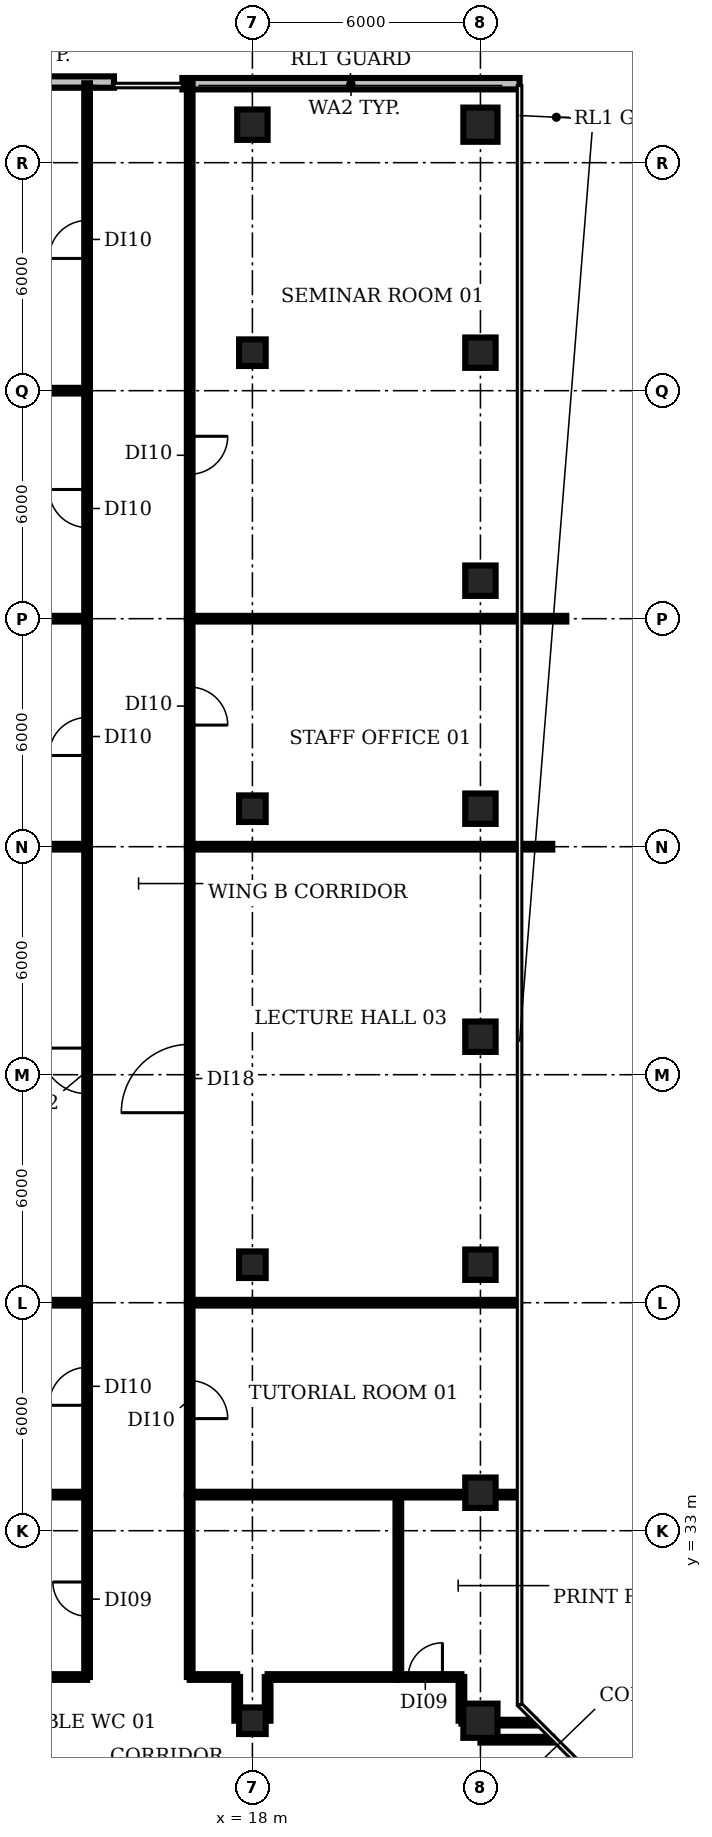
"""IFC4 building model, lengths in metres.
Left out: names, types, materials, properties, quantities, classifications, styles, units other than length and angle.
Written with IfcOpenShell. Run it as: python <this file> out.ifc"""

import sys

from ifc_helpers import new_model, si_unit, direction, frame, frame_2d, origin, origin_2d, place, context, subcontext, project, spatial, rectangle, circle, extrude, element, fill, save


model = new_model("IFC4")
c1 = context("Model", 3, precision=1e-05, world=origin(), true_north=direction((0.0, 1.0)))
c2 = subcontext(c1, "Body", "Model", "MODEL_VIEW")
j1 = project(units=[si_unit("LENGTHUNIT", "METRE"), si_unit("PLANEANGLEUNIT", "RADIAN")], contexts=[c1])
p1 = place(None, origin())
s1 = spatial("IfcSite", under=j1, at=p1, CompositionType="ELEMENT")
p2 = place(p1, origin())
s2 = spatial("IfcBuilding", under=s1, at=p2, CompositionType="ELEMENT")
p3 = place(p2, frame((0.0, 0.0, 243.2)))
s3 = spatial("IfcBuildingStorey", under=s2, at=p3, CompositionType="ELEMENT", Elevation=243.2)
for number, where, z_axis, x_axis in (
    (1, (18.0, 28.0, 0.0), (0.0, 0.0, 1.0), (1.0, 0.0, 0.0)),
    (2, (18.0, 40.0, 0.0), (0.0, 0.0, 1.0), (1.0, 0.0, 0.0)),
    (3, (18.0, 52.0, 0.0), (0.0, 0.0, 1.0), (1.0, 0.0, 0.0)),
    (4, (18.0, 64.0, 0.0), (0.0, 0.0, 1.0), (1.0, 0.0, 0.0)),
):
    element("IfcColumn", number, at=place(p3, frame(where, z_axis=z_axis, x_axis=x_axis)), inside=s3, PredefinedType="COLUMN", context=c2, shape_type="SweptSolid", body=[
        extrude(rectangle(XDim=0.7, YDim=0.7, at=origin_2d()), origin(), (0.0, 0.0, 1.0), 3.85),
    ])
p4 = place(p3, frame((18.0, 70.0, 0.0), z_axis=(0.0, 0.0, 1.0), x_axis=(1.0, 0.0, 0.0)))
e5 = element("IfcColumn", 5, at=p4, inside=s3, PredefinedType="COLUMN", context=c2, shape_type="SweptSolid", body=[
    extrude(rectangle(XDim=0.8, YDim=0.8, at=origin_2d()), origin(), (0.0, 0.0, 1.0), 3.85),
])
p5 = place(p3, frame((24.0, 28.0, 0.0), z_axis=(0.0, 0.0, 1.0), x_axis=(1.0, 0.0, 0.0)))
e6 = element("IfcColumn", 6, at=p5, inside=s3, PredefinedType="COLUMN", context=c2, shape_type="SweptSolid", body=[
    extrude(circle(Radius=0.45, at=origin_2d()), origin(), (0.0, 0.0, 1.0), 3.85),
])
for number, where, z_axis, x_axis in (
    (7, (24.0, 34.0, 0.0), (0.0, 0.0, 1.0), (1.0, 0.0, 0.0)),
    (8, (24.0, 40.0, 0.0), (0.0, 0.0, 1.0), (1.0, 0.0, 0.0)),
    (9, (24.0, 46.0, 0.0), (0.0, 0.0, 1.0), (1.0, 0.0, 0.0)),
    (10, (24.0, 52.0, 0.0), (0.0, 0.0, 1.0), (1.0, 0.0, 0.0)),
    (11, (24.0, 58.0, 0.0), (0.0, 0.0, 1.0), (1.0, 0.0, 0.0)),
    (12, (24.0, 64.0, 0.0), (0.0, 0.0, 1.0), (1.0, 0.0, 0.0)),
):
    element("IfcColumn", number, at=place(p3, frame(where, z_axis=z_axis, x_axis=x_axis)), inside=s3, PredefinedType="COLUMN", context=c2, shape_type="SweptSolid", body=[
        extrude(rectangle(XDim=0.8, YDim=0.8, at=origin_2d()), origin(), (0.0, 0.0, 1.0), 3.85),
    ])
p6 = place(p3, frame((24.0, 70.0, 0.0), z_axis=(0.0, 0.0, 1.0), x_axis=(1.0, 0.0, 0.0)))
e13 = element("IfcColumn", 13, at=p6, inside=s3, PredefinedType="COLUMN", context=c2, shape_type="SweptSolid", body=[
    extrude(circle(Radius=0.45, at=origin_2d()), origin(), (0.0, 0.0, 1.0), 3.85),
])
p7 = place(p3, frame((25.03, 71.078, 0.0), z_axis=(0.0, 0.0, 1.0), x_axis=(-1.0, 0.0, 0.0)))
e14 = element("IfcWall", 14, at=p7, inside=s3, PredefinedType="SOLIDWALL", context=c2, shape_type="SweptSolid", body=[
    extrude(rectangle(XDim=8.873, YDim=0.3, at=frame_2d((4.436, 0.0))), origin(), (0.0, 0.0, 1.0), 3.85),
])
p8 = place(p3, frame((14.357, 71.122, 0.0), z_axis=(0.0, 0.0, 1.0), x_axis=(-1.0, 0.0, 0.0)))
e15 = element("IfcWall", 15, at=p8, inside=s3, PredefinedType="SOLIDWALL", context=c2, shape_type="SweptSolid", body=[
    extrude(rectangle(XDim=4.715, YDim=0.3, at=frame_2d((2.357, 0.0))), origin(), (0.0, 0.0, 1.0), 3.85),
])
p9 = place(p3, frame((-1.16, 33.95, 0.0), z_axis=(0.0, 0.0, 1.0), x_axis=(1.0, 0.0, 0.0)))
e16 = element("IfcWall", 16, at=p9, inside=s3, PredefinedType="PARTITIONING", context=c2, shape_type="SweptSolid", body=[
    extrude(rectangle(XDim=14.81, YDim=0.15, at=frame_2d((7.405, 0.0))), origin(), (0.0, 0.0, 1.0), 2.88),
])
for number, where, z_axis, x_axis in (
    (17, (-0.98, 39.0, 0.0), (0.0, 0.0, 1.0), (1.0, 0.0, 0.0)),
    (18, (-0.98, 51.0, 0.0), (0.0, 0.0, 1.0), (1.0, 0.0, 0.0)),
    (19, (-0.98, 57.0, 0.0), (0.0, 0.0, 1.0), (1.0, 0.0, 0.0)),
    (20, (-0.98, 63.0, 0.0), (0.0, 0.0, 1.0), (1.0, 0.0, 0.0)),
):
    element("IfcWall", number, at=place(p3, frame(where, z_axis=z_axis, x_axis=x_axis)), inside=s3, PredefinedType="PARTITIONING", context=c2, shape_type="SweptSolid", body=[
        extrude(rectangle(XDim=14.63, YDim=0.15, at=frame_2d((7.315, 0.0))), origin(), (0.0, 0.0, 1.0), 2.88),
    ])
p10 = place(p3, frame((6.4, 29.15, 0.0), z_axis=(0.0, 0.0, 1.0), x_axis=(1.0, 0.0, 0.0)))
e21 = element("IfcWall", 21, at=p10, inside=s3, PredefinedType="PARTITIONING", context=c2, shape_type="SweptSolid", body=[
    extrude(rectangle(XDim=7.25, YDim=0.15, at=frame_2d((3.625, 0.0))), origin(), (0.0, 0.0, 1.0), 2.88),
])
p11 = place(p3, frame((13.65, 29.15, 0.0), z_axis=(0.0, 0.0, 1.0), x_axis=(0.0, 1.0, 0.0)))
e22 = element("IfcWall", 22, at=p11, inside=s3, PredefinedType="PARTITIONING", context=c2, shape_type="SweptSolid", body=[
    extrude(rectangle(XDim=4.8, YDim=0.15, at=frame_2d((2.4, 0.0))), origin(), (0.0, 0.0, 1.0), 2.88),
])
p12 = place(p11, frame((1.6, 0.0, 0.0)))
e23 = element("IfcOpeningElement", 23, at=p12, cuts=e22, PredefinedType="OPENING", context=c2, shape_type="SweptSolid", body=[
    extrude(rectangle(XDim=0.9, YDim=2.1, at=frame_2d((0.45, 1.05))), frame((0.0, 0.085, 0.0), z_axis=(0.0, -1.0, 0.0), x_axis=(1.0, 0.0, 0.0)), (0.0, 0.0, 1.0), 0.17),
])
p13 = place(p3, frame((13.65, 33.95, 0.0), z_axis=(0.0, 0.0, 1.0), x_axis=(0.0, 1.0, 0.0)))
e24 = element("IfcWall", 24, at=p13, inside=s3, PredefinedType="PARTITIONING", context=c2, shape_type="SweptSolid", body=[
    extrude(rectangle(XDim=5.05, YDim=0.15, at=frame_2d((2.525, 0.0))), origin(), (0.0, 0.0, 1.0), 2.88),
])
p14 = place(p13, frame((2.35, 0.0, 0.0)))
e25 = element("IfcOpeningElement", 25, at=p14, cuts=e24, PredefinedType="OPENING", context=c2, shape_type="SweptSolid", body=[
    extrude(rectangle(XDim=1.0, YDim=2.1, at=frame_2d((0.5, 1.05))), frame((0.0, 0.085, 0.0), z_axis=(0.0, -1.0, 0.0), x_axis=(1.0, 0.0, 0.0)), (0.0, 0.0, 1.0), 0.17),
])
p15 = place(p3, frame((13.65, 39.0, 0.0), z_axis=(0.0, 0.0, 1.0), x_axis=(0.0, 1.0, 0.0)))
e26 = element("IfcWall", 26, at=p15, inside=s3, PredefinedType="PARTITIONING", context=c2, shape_type="SweptSolid", body=[
    extrude(rectangle(XDim=12.0, YDim=0.15, at=frame_2d((6.0, 0.0))), origin(), (0.0, 0.0, 1.0), 2.88),
])
p16 = place(p15, frame((5.5, 0.0, 0.0)))
e27 = element("IfcOpeningElement", 27, at=p16, cuts=e26, PredefinedType="OPENING", context=c2, shape_type="SweptSolid", body=[
    extrude(rectangle(XDim=1.2, YDim=2.1, at=frame_2d((0.6, 1.05))), frame((0.0, 0.085, 0.0), z_axis=(0.0, -1.0, 0.0), x_axis=(1.0, 0.0, 0.0)), (0.0, 0.0, 1.0), 0.17),
])
p17 = place(p3, frame((13.65, 51.0, 0.0), z_axis=(0.0, 0.0, 1.0), x_axis=(0.0, 1.0, 0.0)))
e28 = element("IfcWall", 28, at=p17, inside=s3, PredefinedType="PARTITIONING", context=c2, shape_type="SweptSolid", body=[
    extrude(rectangle(XDim=6.0, YDim=0.15, at=frame_2d((3.0, 0.0))), origin(), (0.0, 0.0, 1.0), 2.88),
])
p18 = place(p17, frame((2.4, 0.0, 0.0)))
e29 = element("IfcOpeningElement", 29, at=p18, cuts=e28, PredefinedType="OPENING", context=c2, shape_type="SweptSolid", body=[
    extrude(rectangle(XDim=1.0, YDim=2.1, at=frame_2d((0.5, 1.05))), frame((0.0, 0.085, 0.0), z_axis=(0.0, -1.0, 0.0), x_axis=(1.0, 0.0, 0.0)), (0.0, 0.0, 1.0), 0.17),
])
p19 = place(p3, frame((13.65, 57.0, 0.0), z_axis=(0.0, 0.0, 1.0), x_axis=(0.0, 1.0, 0.0)))
e30 = element("IfcWall", 30, at=p19, inside=s3, PredefinedType="PARTITIONING", context=c2, shape_type="SweptSolid", body=[
    extrude(rectangle(XDim=6.0, YDim=0.15, at=frame_2d((3.0, 0.0))), origin(), (0.0, 0.0, 1.0), 2.88),
])
p20 = place(p19, frame((2.4, 0.0, 0.0)))
e31 = element("IfcOpeningElement", 31, at=p20, cuts=e30, PredefinedType="OPENING", context=c2, shape_type="SweptSolid", body=[
    extrude(rectangle(XDim=1.0, YDim=2.1, at=frame_2d((0.5, 1.05))), frame((0.0, 0.085, 0.0), z_axis=(0.0, -1.0, 0.0), x_axis=(1.0, 0.0, 0.0)), (0.0, 0.0, 1.0), 0.17),
])
p21 = place(p3, frame((13.65, 63.0, 0.0), z_axis=(0.0, 0.0, 1.0), x_axis=(0.0, 1.0, 0.0)))
e32 = element("IfcWall", 32, at=p21, inside=s3, PredefinedType="PARTITIONING", context=c2, shape_type="SweptSolid", body=[
    extrude(rectangle(XDim=8.09, YDim=0.15, at=frame_2d((4.045, 0.0))), origin(), (0.0, 0.0, 1.0), 2.88),
])
p22 = place(p21, frame((3.48, 0.0, 0.0)))
e33 = element("IfcOpeningElement", 33, at=p22, cuts=e32, PredefinedType="OPENING", context=c2, shape_type="SweptSolid", body=[
    extrude(rectangle(XDim=1.0, YDim=2.1, at=frame_2d((0.5, 1.05))), frame((0.0, 0.085, 0.0), z_axis=(0.0, -1.0, 0.0), x_axis=(1.0, 0.0, 0.0)), (0.0, 0.0, 1.0), 0.17),
])
p23 = place(p3, frame((16.35, 29.15, 0.0), z_axis=(0.0, 0.0, 1.0), x_axis=(0.0, 1.0, 0.0)))
e34 = element("IfcWall", 34, at=p23, inside=s3, PredefinedType="PARTITIONING", context=c2, shape_type="SweptSolid", body=[
    extrude(rectangle(XDim=4.8, YDim=0.15, at=frame_2d((2.4, 0.0))), origin(), (0.0, 0.0, 1.0), 2.88),
])
p24 = place(p3, frame((16.35, 29.15, 0.0), z_axis=(0.0, 0.0, 1.0), x_axis=(1.0, 0.0, 0.0)))
e35 = element("IfcWall", 35, at=p24, inside=s3, PredefinedType="PARTITIONING", context=c2, shape_type="SweptSolid", body=[
    extrude(rectangle(XDim=1.25, YDim=0.15, at=frame_2d((0.625, 0.0))), origin(), (0.0, 0.0, 1.0), 2.88),
])
p25 = place(p3, frame((16.35, 33.95, 0.0), z_axis=(0.0, 0.0, 1.0), x_axis=(1.0, 0.0, 0.0)))
e36 = element("IfcWall", 36, at=p25, inside=s3, PredefinedType="PARTITIONING", context=c2, shape_type="SweptSolid", body=[
    extrude(rectangle(XDim=8.63, YDim=0.15, at=frame_2d((4.315, 0.0))), origin(), (0.0, 0.0, 1.0), 2.88),
])
p26 = place(p3, frame((16.35, 39.0, 0.0), z_axis=(0.0, 0.0, 1.0), x_axis=(0.0, -1.0, 0.0)))
e37 = element("IfcWall", 37, at=p26, inside=s3, PredefinedType="PARTITIONING", context=c2, shape_type="SweptSolid", body=[
    extrude(rectangle(XDim=5.05, YDim=0.15, at=frame_2d((2.525, 0.0))), origin(), (0.0, 0.0, 1.0), 2.88),
])
p27 = place(p26, frame((2.05, 0.0, 0.0)))
e38 = element("IfcOpeningElement", 38, at=p27, cuts=e37, PredefinedType="OPENING", context=c2, shape_type="SweptSolid", body=[
    extrude(rectangle(XDim=1.0, YDim=2.1, at=frame_2d((0.5, 1.05))), frame((0.0, 0.085, 0.0), z_axis=(0.0, -1.0, 0.0), x_axis=(1.0, 0.0, 0.0)), (0.0, 0.0, 1.0), 0.17),
])
p28 = place(p3, frame((16.35, 39.0, 0.0), z_axis=(0.0, 0.0, 1.0), x_axis=(0.0, 1.0, 0.0)))
e39 = element("IfcWall", 39, at=p28, inside=s3, PredefinedType="PARTITIONING", context=c2, shape_type="SweptSolid", body=[
    extrude(rectangle(XDim=12.0, YDim=0.15, at=frame_2d((6.0, 0.0))), origin(), (0.0, 0.0, 1.0), 2.88),
])
p29 = place(p28, frame((5.0, 0.0, 0.0)))
e40 = element("IfcOpeningElement", 40, at=p29, cuts=e39, PredefinedType="OPENING", context=c2, shape_type="SweptSolid", body=[
    extrude(rectangle(XDim=1.8, YDim=2.1, at=frame_2d((0.9, 1.05))), frame((0.0, 0.085, 0.0), z_axis=(0.0, -1.0, 0.0), x_axis=(1.0, 0.0, 0.0)), (0.0, 0.0, 1.0), 0.17),
])
p30 = place(p3, frame((16.35, 39.0, 0.0), z_axis=(0.0, 0.0, 1.0), x_axis=(1.0, 0.0, 0.0)))
e41 = element("IfcWall", 41, at=p30, inside=s3, PredefinedType="PARTITIONING", context=c2, shape_type="SweptSolid", body=[
    extrude(rectangle(XDim=8.62, YDim=0.15, at=frame_2d((4.31, 0.0))), origin(), (0.0, 0.0, 1.0), 2.88),
])
p31 = place(p3, frame((16.35, 51.0, 0.0), z_axis=(0.0, 0.0, 1.0), x_axis=(1.0, 0.0, 0.0)))
e42 = element("IfcWall", 42, at=p31, inside=s3, PredefinedType="PARTITIONING", context=c2, shape_type="SweptSolid", body=[
    extrude(rectangle(XDim=9.54, YDim=0.15, at=frame_2d((4.77, 0.0))), origin(), (0.0, 0.0, 1.0), 2.88),
])
p32 = place(p3, frame((16.35, 57.0, 0.0), z_axis=(0.0, 0.0, 1.0), x_axis=(0.0, -1.0, 0.0)))
e43 = element("IfcWall", 43, at=p32, inside=s3, PredefinedType="PARTITIONING", context=c2, shape_type="SweptSolid", body=[
    extrude(rectangle(XDim=6.0, YDim=0.15, at=frame_2d((3.0, 0.0))), origin(), (0.0, 0.0, 1.0), 2.88),
])
p33 = place(p32, frame((1.8, 0.0, 0.0)))
e44 = element("IfcOpeningElement", 44, at=p33, cuts=e43, PredefinedType="OPENING", context=c2, shape_type="SweptSolid", body=[
    extrude(rectangle(XDim=1.0, YDim=2.1, at=frame_2d((0.5, 1.05))), frame((0.0, 0.085, 0.0), z_axis=(0.0, -1.0, 0.0), x_axis=(1.0, 0.0, 0.0)), (0.0, 0.0, 1.0), 0.17),
])
p34 = place(p3, frame((16.35, 57.0, 0.0), z_axis=(0.0, 0.0, 1.0), x_axis=(1.0, 0.0, 0.0)))
e45 = element("IfcWall", 45, at=p34, inside=s3, PredefinedType="PARTITIONING", context=c2, shape_type="SweptSolid", body=[
    extrude(rectangle(XDim=9.91, YDim=0.15, at=frame_2d((4.955, 0.0))), origin(), (0.0, 0.0, 1.0), 2.88),
])
p35 = place(p3, frame((16.35, 71.09, 0.0), z_axis=(0.0, 0.0, 1.0), x_axis=(0.0, -1.0, 0.0)))
e46 = element("IfcWall", 46, at=p35, inside=s3, PredefinedType="PARTITIONING", context=c2, shape_type="SweptSolid", body=[
    extrude(rectangle(XDim=14.09, YDim=0.15, at=frame_2d((7.045, 0.0))), origin(), (0.0, 0.0, 1.0), 2.88),
])
p36 = place(p35, frame((9.29, 0.0, 0.0)))
e47 = element("IfcOpeningElement", 47, at=p36, cuts=e46, PredefinedType="OPENING", context=c2, shape_type="SweptSolid", body=[
    extrude(rectangle(XDim=1.0, YDim=2.1, at=frame_2d((0.5, 1.05))), frame((0.0, 0.085, 0.0), z_axis=(0.0, -1.0, 0.0), x_axis=(1.0, 0.0, 0.0)), (0.0, 0.0, 1.0), 0.17),
])
for number, where, z_axis, x_axis in (
    (48, (17.6, 28.0, 0.0), (0.0, 0.0, 1.0), (0.0, 1.0, 0.0)),
    (49, (18.4, 28.0, 0.0), (0.0, 0.0, 1.0), (0.0, 1.0, 0.0)),
):
    element("IfcWall", number, at=place(p3, frame(where, z_axis=z_axis, x_axis=x_axis)), inside=s3, PredefinedType="PARTITIONING", context=c2, shape_type="SweptSolid", body=[
        extrude(rectangle(XDim=1.15, YDim=0.15, at=frame_2d((0.575, 0.0))), origin(), (0.0, 0.0, 1.0), 2.88),
    ])
p37 = place(p3, frame((18.4, 29.15, 0.0), z_axis=(0.0, 0.0, 1.0), x_axis=(1.0, 0.0, 0.0)))
e50 = element("IfcWall", 50, at=p37, inside=s3, PredefinedType="PARTITIONING", context=c2, shape_type="SweptSolid", body=[
    extrude(rectangle(XDim=3.44, YDim=0.15, at=frame_2d((1.72, 0.0))), origin(), (0.0, 0.0, 1.0), 2.88),
])
p38 = place(p3, frame((21.84, 29.15, 0.0), z_axis=(0.0, 0.0, 1.0), x_axis=(0.0, 1.0, 0.0)))
e51 = element("IfcWall", 51, at=p38, inside=s3, PredefinedType="PARTITIONING", context=c2, shape_type="SweptSolid", body=[
    extrude(rectangle(XDim=4.8, YDim=0.15, at=frame_2d((2.4, 0.0))), origin(), (0.0, 0.0, 1.0), 2.88),
])
p39 = place(p3, frame((21.84, 29.15, 0.0), z_axis=(0.0, 0.0, 1.0), x_axis=(1.0, 0.0, 0.0)))
e52 = element("IfcWall", 52, at=p39, inside=s3, PredefinedType="PARTITIONING", context=c2, shape_type="SweptSolid", body=[
    extrude(rectangle(XDim=1.66, YDim=0.15, at=frame_2d((0.83, 0.0))), origin(), (0.0, 0.0, 1.0), 2.88),
])
p40 = place(p39, frame((0.26, 0.0, 0.0)))
e53 = element("IfcOpeningElement", 53, at=p40, cuts=e52, PredefinedType="OPENING", context=c2, shape_type="SweptSolid", body=[
    extrude(rectangle(XDim=0.9, YDim=2.1, at=frame_2d((0.45, 1.05))), frame((0.0, 0.085, 0.0), z_axis=(0.0, -1.0, 0.0), x_axis=(1.0, 0.0, 0.0)), (0.0, 0.0, 1.0), 0.17),
])
p41 = place(p3, frame((23.5, 28.0, 0.0), z_axis=(0.0, 0.0, 1.0), x_axis=(0.0, 1.0, 0.0)))
e54 = element("IfcWall", 54, at=p41, inside=s3, PredefinedType="PARTITIONING", context=c2, shape_type="SweptSolid", body=[
    extrude(rectangle(XDim=1.15, YDim=0.15, at=frame_2d((0.575, 0.0))), origin(), (0.0, 0.0, 1.0), 2.88),
])
p42 = place(p3, frame((23.5, 28.0, 0.0), z_axis=(0.0, 0.0, 1.0), x_axis=(1.0, 0.0, 0.0)))
e55 = element("IfcWall", 55, at=p42, inside=s3, PredefinedType="PARTITIONING", context=c2, shape_type="SweptSolid", body=[
    extrude(rectangle(XDim=0.5, YDim=0.15, at=frame_2d((0.25, 0.0))), origin(), (0.0, 0.0, 1.0), 2.88),
])
p43 = place(p3, frame((24.0, 27.5, 0.0), z_axis=(0.0, 0.0, 1.0), x_axis=(1.0, 0.0, 0.0)))
e56 = element("IfcWall", 56, at=p43, inside=s3, PredefinedType="PARTITIONING", context=c2, shape_type="SweptSolid", body=[
    extrude(rectangle(XDim=1.89, YDim=0.15, at=frame_2d((0.945, 0.0))), origin(), (0.0, 0.0, 1.0), 2.88),
])
p44 = place(p3, frame((24.0, 27.95, 0.0), z_axis=(0.0, 0.0, 1.0), x_axis=(1.0, 0.0, 0.0)))
e57 = element("IfcWall", 57, at=p44, inside=s3, PredefinedType="PARTITIONING", context=c2, shape_type="SweptSolid", body=[
    extrude(rectangle(XDim=1.44, YDim=0.15, at=frame_2d((0.72, 0.0))), origin(), (0.0, 0.0, 1.0), 2.88),
])
p45 = place(p12, origin())
e58 = element("IfcDoor", 58, at=p45, inside=s3, OperationType="SINGLE_SWING_RIGHT", PredefinedType="DOOR", context=c2, shape_type="SweptSolid", body=[
    extrude(rectangle(XDim=0.9, YDim=2.1, at=frame_2d((0.45, 1.05))), frame((0.0, 0.025, 0.0), z_axis=(0.0, -1.0, 0.0), x_axis=(1.0, 0.0, 0.0)), (0.0, 0.0, 1.0), 0.05),
])
fill(e23, e58)
p46 = place(p14, origin())
e59 = element("IfcDoor", 59, at=p46, inside=s3, OperationType="SINGLE_SWING_LEFT", PredefinedType="DOOR", context=c2, shape_type="SweptSolid", body=[
    extrude(rectangle(XDim=1.0, YDim=2.1, at=frame_2d((0.5, 1.05))), frame((0.0, 0.025, 0.0), z_axis=(0.0, -1.0, 0.0), x_axis=(1.0, 0.0, 0.0)), (0.0, 0.0, 1.0), 0.05),
])
fill(e25, e59)
p47 = place(p16, origin())
e60 = element("IfcDoor", 60, at=p47, inside=s3, OperationType="SINGLE_SWING_RIGHT", PredefinedType="DOOR", context=c2, shape_type="SweptSolid", body=[
    extrude(rectangle(XDim=1.2, YDim=2.1, at=frame_2d((0.6, 1.05))), frame((0.0, 0.025, 0.0), z_axis=(0.0, -1.0, 0.0), x_axis=(1.0, 0.0, 0.0)), (0.0, 0.0, 1.0), 0.05),
])
fill(e27, e60)
p48 = place(p18, origin())
e61 = element("IfcDoor", 61, at=p48, inside=s3, OperationType="SINGLE_SWING_LEFT", PredefinedType="DOOR", context=c2, shape_type="SweptSolid", body=[
    extrude(rectangle(XDim=1.0, YDim=2.1, at=frame_2d((0.5, 1.05))), frame((0.0, 0.025, 0.0), z_axis=(0.0, -1.0, 0.0), x_axis=(1.0, 0.0, 0.0)), (0.0, 0.0, 1.0), 0.05),
])
fill(e29, e61)
p49 = place(p20, origin())
e62 = element("IfcDoor", 62, at=p49, inside=s3, OperationType="SINGLE_SWING_RIGHT", PredefinedType="DOOR", context=c2, shape_type="SweptSolid", body=[
    extrude(rectangle(XDim=1.0, YDim=2.1, at=frame_2d((0.5, 1.05))), frame((0.0, 0.025, 0.0), z_axis=(0.0, -1.0, 0.0), x_axis=(1.0, 0.0, 0.0)), (0.0, 0.0, 1.0), 0.05),
])
fill(e31, e62)
p50 = place(p22, origin())
e63 = element("IfcDoor", 63, at=p50, inside=s3, OperationType="SINGLE_SWING_LEFT", PredefinedType="DOOR", context=c2, shape_type="SweptSolid", body=[
    extrude(rectangle(XDim=1.0, YDim=2.1, at=frame_2d((0.5, 1.05))), frame((0.0, 0.025, 0.0), z_axis=(0.0, -1.0, 0.0), x_axis=(1.0, 0.0, 0.0)), (0.0, 0.0, 1.0), 0.05),
])
fill(e33, e63)
p51 = place(p27, origin())
e64 = element("IfcDoor", 64, at=p51, inside=s3, OperationType="SINGLE_SWING_RIGHT", PredefinedType="DOOR", context=c2, shape_type="SweptSolid", body=[
    extrude(rectangle(XDim=1.0, YDim=2.1, at=frame_2d((0.5, 1.05))), frame((0.0, 0.025, 0.0), z_axis=(0.0, -1.0, 0.0), x_axis=(1.0, 0.0, 0.0)), (0.0, 0.0, 1.0), 0.05),
])
fill(e38, e64)
p52 = place(p29, origin())
e65 = element("IfcDoor", 65, at=p52, inside=s3, OperationType="SINGLE_SWING_LEFT", PredefinedType="DOOR", context=c2, shape_type="SweptSolid", body=[
    extrude(rectangle(XDim=1.8, YDim=2.1, at=frame_2d((0.9, 1.05))), frame((0.0, 0.025, 0.0), z_axis=(0.0, -1.0, 0.0), x_axis=(1.0, 0.0, 0.0)), (0.0, 0.0, 1.0), 0.05),
])
fill(e40, e65)
p53 = place(p33, origin())
e66 = element("IfcDoor", 66, at=p53, inside=s3, OperationType="SINGLE_SWING_RIGHT", PredefinedType="DOOR", context=c2, shape_type="SweptSolid", body=[
    extrude(rectangle(XDim=1.0, YDim=2.1, at=frame_2d((0.5, 1.05))), frame((0.0, 0.025, 0.0), z_axis=(0.0, -1.0, 0.0), x_axis=(1.0, 0.0, 0.0)), (0.0, 0.0, 1.0), 0.05),
])
fill(e44, e66)
p54 = place(p36, origin())
e67 = element("IfcDoor", 67, at=p54, inside=s3, OperationType="SINGLE_SWING_LEFT", PredefinedType="DOOR", context=c2, shape_type="SweptSolid", body=[
    extrude(rectangle(XDim=1.0, YDim=2.1, at=frame_2d((0.5, 1.05))), frame((0.0, 0.025, 0.0), z_axis=(0.0, -1.0, 0.0), x_axis=(1.0, 0.0, 0.0)), (0.0, 0.0, 1.0), 0.05),
])
fill(e47, e67)
p55 = place(p40, origin())
e68 = element("IfcDoor", 68, at=p55, inside=s3, OperationType="SINGLE_SWING_RIGHT", PredefinedType="DOOR", context=c2, shape_type="SweptSolid", body=[
    extrude(rectangle(XDim=0.9, YDim=2.1, at=frame_2d((0.45, 1.05))), frame((0.0, 0.025, 0.0), z_axis=(0.0, -1.0, 0.0), x_axis=(1.0, 0.0, 0.0)), (0.0, 0.0, 1.0), 0.05),
])
fill(e53, e68)
save(model, sys.argv[1])
